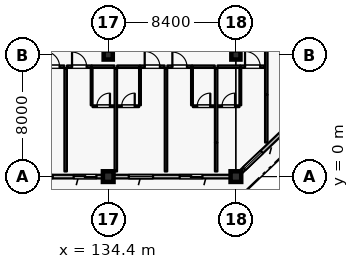
"""IFC4 building model, lengths in metres.
Left out: names, types, materials, properties, quantities, classifications, styles, units other than length and angle.
Written with IfcOpenShell. Run it as: python <this file> out.ifc"""

import sys

from ifc_helpers import new_model, si_unit, direction, frame, frame_2d, origin, origin_2d, place, context, subcontext, project, spatial, rectangle, extrude, element, fill, save


model = new_model("IFC4")
c1 = context("Model", 3, precision=1e-05, world=origin(), true_north=direction((0.0, 1.0)))
c2 = subcontext(c1, "Body", "Model", "MODEL_VIEW")
j1 = project(units=[si_unit("LENGTHUNIT", "METRE"), si_unit("PLANEANGLEUNIT", "RADIAN")], contexts=[c1])
p1 = place(None, origin())
s1 = spatial("IfcSite", under=j1, at=p1, CompositionType="ELEMENT")
p2 = place(p1, origin())
s2 = spatial("IfcBuilding", under=s1, at=p2, CompositionType="ELEMENT")
p3 = place(p2, frame((0.0, 0.0, 32.4)))
s3 = spatial("IfcBuildingStorey", under=s2, at=p3, CompositionType="ELEMENT", Elevation=32.4)
for number, where, z_axis, x_axis in (
    (1, (134.4, 0.0, 0.0), (0.0, 0.0, 1.0), (1.0, 0.0, 0.0)),
    (2, (142.8, 0.0, 0.0), (0.0, 0.0, 1.0), (1.0, 0.0, 0.0)),
):
    element("IfcColumn", number, at=place(p3, frame(where, z_axis=z_axis, x_axis=x_axis)), inside=s3, PredefinedType="COLUMN", context=c2, shape_type="SweptSolid", body=[
        extrude(rectangle(XDim=0.7, YDim=0.7, at=origin_2d()), origin(), (0.0, 0.0, 1.0), 3.6),
    ])
for number, where, z_axis, x_axis in (
    (3, (134.4, 8.0, 0.0), (0.0, 0.0, 1.0), (1.0, 0.0, 0.0)),
    (4, (142.8, 8.0, 0.0), (0.0, 0.0, 1.0), (1.0, 0.0, 0.0)),
):
    element("IfcColumn", number, at=place(p3, frame(where, z_axis=z_axis, x_axis=x_axis)), inside=s3, PredefinedType="COLUMN", context=c2, shape_type="SweptSolid", body=[
        extrude(rectangle(XDim=0.6, YDim=0.6, at=origin_2d()), origin(), (0.0, 0.0, 1.0), 3.6),
    ])
p4 = place(p3, frame((134.05, 0.0, 0.0), z_axis=(0.0, 0.0, 1.0), x_axis=(-1.0, 0.0, 0.0)))
e5 = element("IfcWall", 5, at=p4, inside=s3, PredefinedType="SOLIDWALL", context=c2, shape_type="SweptSolid", body=[
    extrude(rectangle(XDim=7.7, YDim=0.24, at=frame_2d((3.85, 0.0))), origin(), (0.0, 0.0, 1.0), 2.94),
])
p5 = place(p4, frame((0.425, 0.0, 0.0)))
e6 = element("IfcOpeningElement", 6, at=p5, cuts=e5, PredefinedType="OPENING", context=c2, shape_type="SweptSolid", body=[
    extrude(rectangle(XDim=1.5, YDim=2.25, at=frame_2d((0.75, 1.125))), frame((0.0, 0.13, 0.0), z_axis=(0.0, -1.0, 0.0), x_axis=(1.0, 0.0, 0.0)), (0.0, 0.0, 1.0), 0.26),
])
p6 = place(p4, frame((3.3, 0.0, 0.8)))
e7 = element("IfcOpeningElement", 7, at=p6, cuts=e5, PredefinedType="OPENING", context=c2, shape_type="SweptSolid", body=[
    extrude(rectangle(XDim=1.6, YDim=1.6, at=frame_2d((0.8, 0.8))), frame((0.0, 0.13, 0.0), z_axis=(0.0, -1.0, 0.0), x_axis=(1.0, 0.0, 0.0)), (0.0, 0.0, 1.0), 0.26),
])
p7 = place(p4, frame((5.975, 0.0, 0.8)))
e8 = element("IfcOpeningElement", 8, at=p7, cuts=e5, PredefinedType="OPENING", context=c2, shape_type="SweptSolid", body=[
    extrude(rectangle(XDim=1.6, YDim=1.6, at=frame_2d((0.8, 0.8))), frame((0.0, 0.13, 0.0), z_axis=(0.0, -1.0, 0.0), x_axis=(1.0, 0.0, 0.0)), (0.0, 0.0, 1.0), 0.26),
])
p8 = place(p3, frame((142.45, 0.0, 0.0), z_axis=(0.0, 0.0, 1.0), x_axis=(-1.0, 0.0, 0.0)))
e9 = element("IfcWall", 9, at=p8, inside=s3, PredefinedType="SOLIDWALL", context=c2, shape_type="SweptSolid", body=[
    extrude(rectangle(XDim=7.7, YDim=0.24, at=frame_2d((3.85, 0.0))), origin(), (0.0, 0.0, 1.0), 2.94),
])
p9 = place(p8, frame((1.85, 0.0, 0.0)))
e10 = element("IfcOpeningElement", 10, at=p9, cuts=e9, PredefinedType="OPENING", context=c2, shape_type="SweptSolid", body=[
    extrude(rectangle(XDim=1.5, YDim=2.25, at=frame_2d((0.75, 1.125))), frame((0.0, 0.13, 0.0), z_axis=(0.0, -1.0, 0.0), x_axis=(1.0, 0.0, 0.0)), (0.0, 0.0, 1.0), 0.26),
])
p10 = place(p8, frame((5.1, 0.0, 0.8)))
e11 = element("IfcOpeningElement", 11, at=p10, cuts=e9, PredefinedType="OPENING", context=c2, shape_type="SweptSolid", body=[
    extrude(rectangle(XDim=1.6, YDim=1.6, at=frame_2d((0.8, 0.8))), frame((0.0, 0.13, 0.0), z_axis=(0.0, -1.0, 0.0), x_axis=(1.0, 0.0, 0.0)), (0.0, 0.0, 1.0), 0.26),
])
p11 = place(p3, frame((150.85, 7.667, 0.0), z_axis=(0.0, 0.0, 1.0), x_axis=(-0.724116091282, -0.689678103427, 0.0)))
e12 = element("IfcWall", 12, at=p11, inside=s3, PredefinedType="SOLIDWALL", context=c2, shape_type="SweptSolid", body=[
    extrude(rectangle(XDim=10.634, YDim=0.24, at=frame_2d((5.317, 0.0))), origin(), (0.0, 0.0, 1.0), 2.94),
])
p12 = place(p11, frame((1.08, 0.0, 0.0)))
e13 = element("IfcOpeningElement", 13, at=p12, cuts=e12, PredefinedType="OPENING", context=c2, shape_type="SweptSolid", body=[
    extrude(rectangle(XDim=1.5, YDim=2.25, at=frame_2d((0.75, 1.125))), frame((0.0, 0.13, 0.0), z_axis=(0.0, -1.0, 0.0), x_axis=(1.0, 0.0, 0.0)), (0.0, 0.0, 1.0), 0.26),
])
p13 = place(p11, frame((5.276, 0.0, 0.8)))
e14 = element("IfcOpeningElement", 14, at=p13, cuts=e12, PredefinedType="OPENING", context=c2, shape_type="SweptSolid", body=[
    extrude(rectangle(XDim=1.6, YDim=1.6, at=frame_2d((0.8, 0.8))), frame((0.0, 0.13, 0.0), z_axis=(0.0, -1.0, 0.0), x_axis=(1.0, 0.0, 0.0)), (0.0, 0.0, 1.0), 0.26),
])
p14 = place(p11, frame((8.764, 0.0, 0.8)))
e15 = element("IfcOpeningElement", 15, at=p14, cuts=e12, PredefinedType="OPENING", context=c2, shape_type="SweptSolid", body=[
    extrude(rectangle(XDim=1.6, YDim=1.6, at=frame_2d((0.8, 0.8))), frame((0.0, 0.13, 0.0), z_axis=(0.0, -1.0, 0.0), x_axis=(1.0, 0.0, 0.0)), (0.0, 0.0, 1.0), 0.26),
])
p15 = place(p3, frame((129.89, 7.23, 0.0), z_axis=(0.0, 0.0, 1.0), x_axis=(1.0, 0.0, 0.0)))
e16 = element("IfcWall", 16, at=p15, inside=s3, PredefinedType="PARTITIONING", context=c2, shape_type="SweptSolid", body=[
    extrude(rectangle(XDim=1.62, YDim=0.16, at=frame_2d((0.81, 0.0))), origin(), (0.0, 0.0, 1.0), 3.335),
])
p16 = place(p15, frame((0.31, 0.0, 0.0)))
e17 = element("IfcOpeningElement", 17, at=p16, cuts=e16, PredefinedType="OPENING", context=c2, shape_type="SweptSolid", body=[
    extrude(rectangle(XDim=1.0, YDim=2.25, at=frame_2d((0.5, 1.125))), frame((0.0, 0.09, 0.0), z_axis=(0.0, -1.0, 0.0), x_axis=(1.0, 0.0, 0.0)), (0.0, 0.0, 1.0), 0.18),
])
p17 = place(p3, frame((131.69, 7.23, 0.0), z_axis=(0.0, 0.0, 1.0), x_axis=(1.0, 0.0, 0.0)))
e18 = element("IfcWall", 18, at=p17, inside=s3, PredefinedType="PARTITIONING", context=c2, shape_type="SweptSolid", body=[
    extrude(rectangle(XDim=1.62, YDim=0.16, at=frame_2d((0.81, 0.0))), origin(), (0.0, 0.0, 1.0), 3.335),
])
p18 = place(p17, frame((0.33, 0.0, 0.0)))
e19 = element("IfcOpeningElement", 19, at=p18, cuts=e18, PredefinedType="OPENING", context=c2, shape_type="SweptSolid", body=[
    extrude(rectangle(XDim=0.96, YDim=2.2, at=frame_2d((0.48, 1.1))), frame((0.0, 0.09, 0.0), z_axis=(0.0, -1.0, 0.0), x_axis=(1.0, 0.0, 0.0)), (0.0, 0.0, 1.0), 0.18),
])
p19 = place(p3, frame((133.32, 7.23, 0.0), z_axis=(0.0, 0.0, 1.0), x_axis=(1.0, 0.0, 0.0)))
e20 = element("IfcWall", 20, at=p19, inside=s3, PredefinedType="PARTITIONING", context=c2, shape_type="SweptSolid", body=[
    extrude(rectangle(XDim=1.49, YDim=0.16, at=frame_2d((0.745, 0.0))), origin(), (0.0, 0.0, 1.0), 3.335),
])
p20 = place(p3, frame((133.31, 4.69, 0.0), z_axis=(0.0, 0.0, 1.0), x_axis=(0.0, 1.0, 0.0)))
e21 = element("IfcWall", 21, at=p20, inside=s3, PredefinedType="PARTITIONING", context=c2, shape_type="SweptSolid", body=[
    extrude(rectangle(XDim=2.45, YDim=0.115, at=frame_2d((1.225, 0.0))), origin(), (0.0, 0.0, 1.0), 3.335),
])
p21 = place(p3, frame((133.37, 4.63, 0.0), z_axis=(0.0, 0.0, 1.0), x_axis=(1.0, 0.0, 0.0)))
e22 = element("IfcWall", 22, at=p21, inside=s3, PredefinedType="PARTITIONING", context=c2, shape_type="SweptSolid", body=[
    extrude(rectangle(XDim=1.43, YDim=0.115, at=frame_2d((0.715, 0.0))), origin(), (0.0, 0.0, 1.0), 3.335),
])
p22 = place(p21, frame((0.285, 0.0, 0.0)))
e23 = element("IfcOpeningElement", 23, at=p22, cuts=e22, PredefinedType="OPENING", context=c2, shape_type="SweptSolid", body=[
    extrude(rectangle(XDim=0.86, YDim=2.12, at=frame_2d((0.43, 1.06))), frame((0.0, 0.067, 0.0), z_axis=(0.0, -1.0, 0.0), x_axis=(1.0, 0.0, 0.0)), (0.0, 0.0, 1.0), 0.135),
])
p23 = place(p3, frame((131.6, 0.34, 0.0), z_axis=(0.0, 0.0, 1.0), x_axis=(0.0, 1.0, 0.0)))
e24 = element("IfcWall", 24, at=p23, inside=s3, PredefinedType="PARTITIONING", context=c2, shape_type="SweptSolid", body=[
    extrude(rectangle(XDim=6.8, YDim=0.16, at=frame_2d((3.4, 0.0))), origin(), (0.0, 0.0, 1.0), 3.335),
])
p24 = place(p3, frame((134.99, 7.23, 0.0), z_axis=(0.0, 0.0, 1.0), x_axis=(1.0, 0.0, 0.0)))
e25 = element("IfcWall", 25, at=p24, inside=s3, PredefinedType="PARTITIONING", context=c2, shape_type="SweptSolid", body=[
    extrude(rectangle(XDim=1.49, YDim=0.16, at=frame_2d((0.745, 0.0))), origin(), (0.0, 0.0, 1.0), 3.335),
])
p25 = place(p3, frame((136.49, 7.23, 0.0), z_axis=(0.0, 0.0, 1.0), x_axis=(1.0, 0.0, 0.0)))
e26 = element("IfcWall", 26, at=p25, inside=s3, PredefinedType="PARTITIONING", context=c2, shape_type="SweptSolid", body=[
    extrude(rectangle(XDim=1.62, YDim=0.16, at=frame_2d((0.81, 0.0))), origin(), (0.0, 0.0, 1.0), 3.335),
])
p26 = place(p25, frame((0.31, 0.0, 0.0)))
e27 = element("IfcOpeningElement", 27, at=p26, cuts=e26, PredefinedType="OPENING", context=c2, shape_type="SweptSolid", body=[
    extrude(rectangle(XDim=1.0, YDim=2.25, at=frame_2d((0.5, 1.125))), frame((0.0, 0.09, 0.0), z_axis=(0.0, -1.0, 0.0), x_axis=(1.0, 0.0, 0.0)), (0.0, 0.0, 1.0), 0.18),
])
p27 = place(p3, frame((136.49, 4.69, 0.0), z_axis=(0.0, 0.0, 1.0), x_axis=(0.0, 1.0, 0.0)))
e28 = element("IfcWall", 28, at=p27, inside=s3, PredefinedType="PARTITIONING", context=c2, shape_type="SweptSolid", body=[
    extrude(rectangle(XDim=2.45, YDim=0.115, at=frame_2d((1.225, 0.0))), origin(), (0.0, 0.0, 1.0), 3.335),
])
p28 = place(p3, frame((135.0, 4.63, 0.0), z_axis=(0.0, 0.0, 1.0), x_axis=(1.0, 0.0, 0.0)))
e29 = element("IfcWall", 29, at=p28, inside=s3, PredefinedType="PARTITIONING", context=c2, shape_type="SweptSolid", body=[
    extrude(rectangle(XDim=1.43, YDim=0.115, at=frame_2d((0.715, 0.0))), origin(), (0.0, 0.0, 1.0), 3.335),
])
p29 = place(p28, frame((0.285, 0.0, 0.0)))
e30 = element("IfcOpeningElement", 30, at=p29, cuts=e29, PredefinedType="OPENING", context=c2, shape_type="SweptSolid", body=[
    extrude(rectangle(XDim=0.86, YDim=2.12, at=frame_2d((0.43, 1.06))), frame((0.0, 0.067, 0.0), z_axis=(0.0, -1.0, 0.0), x_axis=(1.0, 0.0, 0.0)), (0.0, 0.0, 1.0), 0.135),
])
p30 = place(p3, frame((134.9, 0.34, 0.0), z_axis=(0.0, 0.0, 1.0), x_axis=(0.0, 1.0, 0.0)))
e31 = element("IfcWall", 31, at=p30, inside=s3, PredefinedType="PARTITIONING", context=c2, shape_type="SweptSolid", body=[
    extrude(rectangle(XDim=6.8, YDim=0.16, at=frame_2d((3.4, 0.0))), origin(), (0.0, 0.0, 1.0), 3.335),
])
p31 = place(p3, frame((138.29, 7.23, 0.0), z_axis=(0.0, 0.0, 1.0), x_axis=(1.0, 0.0, 0.0)))
e32 = element("IfcWall", 32, at=p31, inside=s3, PredefinedType="PARTITIONING", context=c2, shape_type="SweptSolid", body=[
    extrude(rectangle(XDim=1.62, YDim=0.16, at=frame_2d((0.81, 0.0))), origin(), (0.0, 0.0, 1.0), 3.335),
])
p32 = place(p31, frame((0.33, 0.0, 0.0)))
e33 = element("IfcOpeningElement", 33, at=p32, cuts=e32, PredefinedType="OPENING", context=c2, shape_type="SweptSolid", body=[
    extrude(rectangle(XDim=0.96, YDim=2.2, at=frame_2d((0.48, 1.1))), frame((0.0, 0.09, 0.0), z_axis=(0.0, -1.0, 0.0), x_axis=(1.0, 0.0, 0.0)), (0.0, 0.0, 1.0), 0.18),
])
p33 = place(p3, frame((139.92, 7.23, 0.0), z_axis=(0.0, 0.0, 1.0), x_axis=(1.0, 0.0, 0.0)))
e34 = element("IfcWall", 34, at=p33, inside=s3, PredefinedType="PARTITIONING", context=c2, shape_type="SweptSolid", body=[
    extrude(rectangle(XDim=1.49, YDim=0.16, at=frame_2d((0.745, 0.0))), origin(), (0.0, 0.0, 1.0), 3.335),
])
p34 = place(p3, frame((139.91, 4.69, 0.0), z_axis=(0.0, 0.0, 1.0), x_axis=(0.0, 1.0, 0.0)))
e35 = element("IfcWall", 35, at=p34, inside=s3, PredefinedType="PARTITIONING", context=c2, shape_type="SweptSolid", body=[
    extrude(rectangle(XDim=2.45, YDim=0.115, at=frame_2d((1.225, 0.0))), origin(), (0.0, 0.0, 1.0), 3.335),
])
p35 = place(p3, frame((139.97, 4.63, 0.0), z_axis=(0.0, 0.0, 1.0), x_axis=(1.0, 0.0, 0.0)))
e36 = element("IfcWall", 36, at=p35, inside=s3, PredefinedType="PARTITIONING", context=c2, shape_type="SweptSolid", body=[
    extrude(rectangle(XDim=1.43, YDim=0.115, at=frame_2d((0.715, 0.0))), origin(), (0.0, 0.0, 1.0), 3.335),
])
p36 = place(p35, frame((0.285, 0.0, 0.0)))
e37 = element("IfcOpeningElement", 37, at=p36, cuts=e36, PredefinedType="OPENING", context=c2, shape_type="SweptSolid", body=[
    extrude(rectangle(XDim=0.86, YDim=2.12, at=frame_2d((0.43, 1.06))), frame((0.0, 0.067, 0.0), z_axis=(0.0, -1.0, 0.0), x_axis=(1.0, 0.0, 0.0)), (0.0, 0.0, 1.0), 0.135),
])
p37 = place(p3, frame((138.2, 0.34, 0.0), z_axis=(0.0, 0.0, 1.0), x_axis=(0.0, 1.0, 0.0)))
e38 = element("IfcWall", 38, at=p37, inside=s3, PredefinedType="PARTITIONING", context=c2, shape_type="SweptSolid", body=[
    extrude(rectangle(XDim=6.8, YDim=0.16, at=frame_2d((3.4, 0.0))), origin(), (0.0, 0.0, 1.0), 3.335),
])
p38 = place(p3, frame((141.5, 0.34, 0.0), z_axis=(0.0, 0.0, 1.0), x_axis=(0.0, 1.0, 0.0)))
e39 = element("IfcWall", 39, at=p38, inside=s3, PredefinedType="PARTITIONING", context=c2, shape_type="SweptSolid", body=[
    extrude(rectangle(XDim=1.89, YDim=0.16, at=frame_2d((0.945, 0.0))), origin(), (0.0, 0.0, 1.0), 3.335),
])
p39 = place(p3, frame((141.59, 7.23, 0.0), z_axis=(0.0, 0.0, 1.0), x_axis=(1.0, 0.0, 0.0)))
e40 = element("IfcWall", 40, at=p39, inside=s3, PredefinedType="PARTITIONING", context=c2, shape_type="SweptSolid", body=[
    extrude(rectangle(XDim=1.49, YDim=0.16, at=frame_2d((0.745, 0.0))), origin(), (0.0, 0.0, 1.0), 3.335),
])
p40 = place(p3, frame((143.09, 7.23, 0.0), z_axis=(0.0, 0.0, 1.0), x_axis=(1.0, 0.0, 0.0)))
e41 = element("IfcWall", 41, at=p40, inside=s3, PredefinedType="PARTITIONING", context=c2, shape_type="SweptSolid", body=[
    extrude(rectangle(XDim=1.62, YDim=0.16, at=frame_2d((0.81, 0.0))), origin(), (0.0, 0.0, 1.0), 3.335),
])
p41 = place(p40, frame((0.31, 0.0, 0.0)))
e42 = element("IfcOpeningElement", 42, at=p41, cuts=e41, PredefinedType="OPENING", context=c2, shape_type="SweptSolid", body=[
    extrude(rectangle(XDim=1.0, YDim=2.25, at=frame_2d((0.5, 1.125))), frame((0.0, 0.09, 0.0), z_axis=(0.0, -1.0, 0.0), x_axis=(1.0, 0.0, 0.0)), (0.0, 0.0, 1.0), 0.18),
])
p42 = place(p3, frame((143.09, 4.69, 0.0), z_axis=(0.0, 0.0, 1.0), x_axis=(0.0, 1.0, 0.0)))
e43 = element("IfcWall", 43, at=p42, inside=s3, PredefinedType="PARTITIONING", context=c2, shape_type="SweptSolid", body=[
    extrude(rectangle(XDim=2.45, YDim=0.115, at=frame_2d((1.225, 0.0))), origin(), (0.0, 0.0, 1.0), 3.335),
])
p43 = place(p3, frame((141.6, 4.63, 0.0), z_axis=(0.0, 0.0, 1.0), x_axis=(1.0, 0.0, 0.0)))
e44 = element("IfcWall", 44, at=p43, inside=s3, PredefinedType="PARTITIONING", context=c2, shape_type="SweptSolid", body=[
    extrude(rectangle(XDim=1.43, YDim=0.115, at=frame_2d((0.715, 0.0))), origin(), (0.0, 0.0, 1.0), 3.335),
])
p44 = place(p43, frame((0.285, 0.0, 0.0)))
e45 = element("IfcOpeningElement", 45, at=p44, cuts=e44, PredefinedType="OPENING", context=c2, shape_type="SweptSolid", body=[
    extrude(rectangle(XDim=0.86, YDim=2.12, at=frame_2d((0.43, 1.06))), frame((0.0, 0.067, 0.0), z_axis=(0.0, -1.0, 0.0), x_axis=(1.0, 0.0, 0.0)), (0.0, 0.0, 1.0), 0.135),
])
p45 = place(p3, frame((141.5, 2.24, 0.0), z_axis=(0.0, 0.0, 1.0), x_axis=(0.0, 1.0, 0.0)))
e46 = element("IfcWall", 46, at=p45, inside=s3, PredefinedType="PARTITIONING", context=c2, shape_type="SweptSolid", body=[
    extrude(rectangle(XDim=4.9, YDim=0.16, at=frame_2d((2.45, 0.0))), origin(), (0.0, 0.0, 1.0), 3.335),
])
p46 = place(p3, frame((144.8, 2.24, 0.0), z_axis=(0.0, 0.0, 1.0), x_axis=(0.0, 1.0, 0.0)))
e47 = element("IfcWall", 47, at=p46, inside=s3, PredefinedType="PARTITIONING", context=c2, shape_type="SweptSolid", body=[
    extrude(rectangle(XDim=3.14, YDim=0.16, at=frame_2d((1.57, 0.0))), origin(), (0.0, 0.0, 1.0), 3.335),
])
p47 = place(p3, frame((144.8, 5.39, 0.0), z_axis=(0.0, 0.0, 1.0), x_axis=(0.0, 1.0, 0.0)))
e48 = element("IfcWall", 48, at=p47, inside=s3, PredefinedType="PARTITIONING", context=c2, shape_type="SweptSolid", body=[
    extrude(rectangle(XDim=9.15, YDim=0.16, at=frame_2d((4.575, 0.0))), origin(), (0.0, 0.0, 1.0), 3.335),
])
p48 = place(p5, origin())
e49 = element("IfcDoor", 49, at=p48, inside=s3, OperationType="SLIDING_TO_LEFT", PredefinedType="DOOR", context=c2, shape_type="SweptSolid", body=[
    extrude(rectangle(XDim=1.5, YDim=2.25, at=frame_2d((0.75, 1.125))), frame((0.0, 0.025, 0.0), z_axis=(0.0, -1.0, 0.0), x_axis=(1.0, 0.0, 0.0)), (0.0, 0.0, 1.0), 0.05),
])
fill(e6, e49)
p49 = place(p6, origin())
e50 = element("IfcWindow", 50, at=p49, inside=s3, PartitioningType="SINGLE_PANEL", PredefinedType="WINDOW", context=c2, shape_type="SweptSolid", body=[
    extrude(rectangle(XDim=1.6, YDim=1.6, at=frame_2d((0.8, 0.8))), frame((0.0, 0.03, 0.0), z_axis=(0.0, -1.0, 0.0), x_axis=(1.0, 0.0, 0.0)), (0.0, 0.0, 1.0), 0.06),
])
fill(e7, e50)
p50 = place(p9, origin())
e51 = element("IfcDoor", 51, at=p50, inside=s3, OperationType="SLIDING_TO_LEFT", PredefinedType="DOOR", context=c2, shape_type="SweptSolid", body=[
    extrude(rectangle(XDim=1.5, YDim=2.25, at=frame_2d((0.75, 1.125))), frame((0.0, 0.025, 0.0), z_axis=(0.0, -1.0, 0.0), x_axis=(1.0, 0.0, 0.0)), (0.0, 0.0, 1.0), 0.05),
])
fill(e10, e51)
p51 = place(p10, origin())
e52 = element("IfcWindow", 52, at=p51, inside=s3, PartitioningType="SINGLE_PANEL", PredefinedType="WINDOW", context=c2, shape_type="SweptSolid", body=[
    extrude(rectangle(XDim=1.6, YDim=1.6, at=frame_2d((0.8, 0.8))), frame((0.0, 0.03, 0.0), z_axis=(0.0, -1.0, 0.0), x_axis=(1.0, 0.0, 0.0)), (0.0, 0.0, 1.0), 0.06),
])
fill(e11, e52)
p52 = place(p14, origin())
e53 = element("IfcWindow", 53, at=p52, inside=s3, PartitioningType="SINGLE_PANEL", PredefinedType="WINDOW", context=c2, shape_type="SweptSolid", body=[
    extrude(rectangle(XDim=1.6, YDim=1.6, at=frame_2d((0.8, 0.8))), frame((0.0, 0.03, 0.0), z_axis=(0.0, -1.0, 0.0), x_axis=(1.0, 0.0, 0.0)), (0.0, 0.0, 1.0), 0.06),
])
fill(e15, e53)
p53 = place(p16, origin())
e54 = element("IfcDoor", 54, at=p53, inside=s3, OperationType="SINGLE_SWING_LEFT", PredefinedType="DOOR", context=c2, shape_type="SweptSolid", body=[
    extrude(rectangle(XDim=1.0, YDim=2.25, at=frame_2d((0.5, 1.125))), frame((0.0, 0.025, 0.0), z_axis=(0.0, -1.0, 0.0), x_axis=(1.0, 0.0, 0.0)), (0.0, 0.0, 1.0), 0.05),
])
fill(e17, e54)
p54 = place(p18, origin())
e55 = element("IfcDoor", 55, at=p54, inside=s3, OperationType="SINGLE_SWING_LEFT", PredefinedType="DOOR", context=c2, shape_type="SweptSolid", body=[
    extrude(rectangle(XDim=0.96, YDim=2.2, at=frame_2d((0.48, 1.1))), frame((0.0, 0.025, 0.0), z_axis=(0.0, -1.0, 0.0), x_axis=(1.0, 0.0, 0.0)), (0.0, 0.0, 1.0), 0.05),
])
fill(e19, e55)
p55 = place(p22, origin())
e56 = element("IfcDoor", 56, at=p55, inside=s3, OperationType="SINGLE_SWING_RIGHT", PredefinedType="DOOR", context=c2, shape_type="SweptSolid", body=[
    extrude(rectangle(XDim=0.86, YDim=2.12, at=frame_2d((0.43, 1.06))), frame((0.0, 0.025, 0.0), z_axis=(0.0, -1.0, 0.0), x_axis=(1.0, 0.0, 0.0)), (0.0, 0.0, 1.0), 0.05),
])
fill(e23, e56)
p56 = place(p26, origin())
e57 = element("IfcDoor", 57, at=p56, inside=s3, OperationType="SINGLE_SWING_LEFT", PredefinedType="DOOR", context=c2, shape_type="SweptSolid", body=[
    extrude(rectangle(XDim=1.0, YDim=2.25, at=frame_2d((0.5, 1.125))), frame((0.0, 0.025, 0.0), z_axis=(0.0, -1.0, 0.0), x_axis=(1.0, 0.0, 0.0)), (0.0, 0.0, 1.0), 0.05),
])
fill(e27, e57)
p57 = place(p29, origin())
e58 = element("IfcDoor", 58, at=p57, inside=s3, OperationType="SINGLE_SWING_RIGHT", PredefinedType="DOOR", context=c2, shape_type="SweptSolid", body=[
    extrude(rectangle(XDim=0.86, YDim=2.12, at=frame_2d((0.43, 1.06))), frame((0.0, 0.025, 0.0), z_axis=(0.0, -1.0, 0.0), x_axis=(1.0, 0.0, 0.0)), (0.0, 0.0, 1.0), 0.05),
])
fill(e30, e58)
p58 = place(p32, origin())
e59 = element("IfcDoor", 59, at=p58, inside=s3, OperationType="SINGLE_SWING_LEFT", PredefinedType="DOOR", context=c2, shape_type="SweptSolid", body=[
    extrude(rectangle(XDim=0.96, YDim=2.2, at=frame_2d((0.48, 1.1))), frame((0.0, 0.025, 0.0), z_axis=(0.0, -1.0, 0.0), x_axis=(1.0, 0.0, 0.0)), (0.0, 0.0, 1.0), 0.05),
])
fill(e33, e59)
p59 = place(p36, origin())
e60 = element("IfcDoor", 60, at=p59, inside=s3, OperationType="SINGLE_SWING_RIGHT", PredefinedType="DOOR", context=c2, shape_type="SweptSolid", body=[
    extrude(rectangle(XDim=0.86, YDim=2.12, at=frame_2d((0.43, 1.06))), frame((0.0, 0.025, 0.0), z_axis=(0.0, -1.0, 0.0), x_axis=(1.0, 0.0, 0.0)), (0.0, 0.0, 1.0), 0.05),
])
fill(e37, e60)
p60 = place(p41, origin())
e61 = element("IfcDoor", 61, at=p60, inside=s3, OperationType="SINGLE_SWING_LEFT", PredefinedType="DOOR", context=c2, shape_type="SweptSolid", body=[
    extrude(rectangle(XDim=1.0, YDim=2.25, at=frame_2d((0.5, 1.125))), frame((0.0, 0.025, 0.0), z_axis=(0.0, -1.0, 0.0), x_axis=(1.0, 0.0, 0.0)), (0.0, 0.0, 1.0), 0.05),
])
fill(e42, e61)
p61 = place(p44, origin())
e62 = element("IfcDoor", 62, at=p61, inside=s3, OperationType="SINGLE_SWING_RIGHT", PredefinedType="DOOR", context=c2, shape_type="SweptSolid", body=[
    extrude(rectangle(XDim=0.86, YDim=2.12, at=frame_2d((0.43, 1.06))), frame((0.0, 0.025, 0.0), z_axis=(0.0, -1.0, 0.0), x_axis=(1.0, 0.0, 0.0)), (0.0, 0.0, 1.0), 0.05),
])
fill(e45, e62)
save(model, sys.argv[1])
